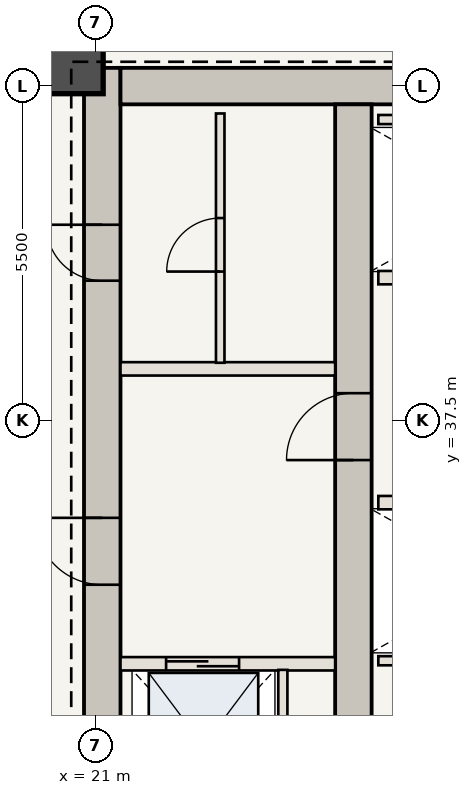
"""IFC4 building model, lengths in metres.
Left out: names, types, materials, properties, quantities, classifications, styles, units other than length and angle.
Written with IfcOpenShell. Run it as: python <this file> out.ifc"""

import sys

from ifc_helpers import new_model, si_unit, direction, frame, frame_2d, origin, origin_2d, place, context, subcontext, project, spatial, rectangle, extrude, element, fill, save


model = new_model("IFC4")
c1 = context("Model", 3, precision=1e-05, world=origin(), true_north=direction((0.0, 1.0)))
c2 = subcontext(c1, "Body", "Model", "MODEL_VIEW")
j1 = project(units=[si_unit("LENGTHUNIT", "METRE"), si_unit("PLANEANGLEUNIT", "RADIAN")], contexts=[c1])
p1 = place(None, origin())
s1 = spatial("IfcSite", under=j1, at=p1, CompositionType="ELEMENT")
p2 = place(p1, origin())
s2 = spatial("IfcBuilding", under=s1, at=p2, CompositionType="ELEMENT")
p3 = place(p2, frame((0.0, 0.0, 149.1)))
s3 = spatial("IfcBuildingStorey", under=s2, at=p3, CompositionType="ELEMENT", Elevation=149.1)
p4 = place(p3, frame((21.11, 30.6, 0.0), z_axis=(0.0, 0.0, 1.0), x_axis=(0.0, 1.0, 0.0)))
e1 = element("IfcWall", 1, at=p4, inside=s3, PredefinedType="SHEAR", context=c2, shape_type="SweptSolid", body=[
    extrude(rectangle(XDim=12.7, YDim=0.6, at=frame_2d((6.35, 0.0))), origin(), (0.0, 0.0, 1.0), 3.85),
])
p5 = place(p4, frame((4.2, 0.0, 0.0)))
e2 = element("IfcOpeningElement", 2, at=p5, cuts=e1, PredefinedType="OPENING", context=c2, shape_type="SweptSolid", body=[
    extrude(rectangle(XDim=1.1, YDim=2.15, at=frame_2d((0.55, 1.075))), frame((0.0, 0.31, 0.0), z_axis=(0.0, -1.0, 0.0), x_axis=(1.0, 0.0, 0.0)), (0.0, 0.0, 1.0), 0.62),
])
p6 = place(p4, frame((9.2, 0.0, 0.0)))
e3 = element("IfcOpeningElement", 3, at=p6, cuts=e1, PredefinedType="OPENING", context=c2, shape_type="SweptSolid", body=[
    extrude(rectangle(XDim=0.92, YDim=2.1, at=frame_2d((0.46, 1.05))), frame((0.0, 0.31, 0.0), z_axis=(0.0, -1.0, 0.0), x_axis=(1.0, 0.0, 0.0)), (0.0, 0.0, 1.0), 0.62),
])
p7 = place(p3, frame((21.41, 43.0, 0.0), z_axis=(0.0, 0.0, 1.0), x_axis=(1.0, 0.0, 0.0)))
e4 = element("IfcWall", 4, at=p7, inside=s3, PredefinedType="SHEAR", context=c2, shape_type="SweptSolid", body=[
    extrude(rectangle(XDim=8.24, YDim=0.6, at=frame_2d((4.12, 0.0))), origin(), (0.0, 0.0, 1.0), 3.85),
])
p8 = place(p3, frame((25.24, 30.6, 0.0), z_axis=(0.0, 0.0, 1.0), x_axis=(0.0, 1.0, 0.0)))
e5 = element("IfcWall", 5, at=p8, inside=s3, PredefinedType="SHEAR", context=c2, shape_type="SweptSolid", body=[
    extrude(rectangle(XDim=12.1, YDim=0.6, at=frame_2d((6.05, 0.0))), origin(), (0.0, 0.0, 1.0), 3.85),
])
p9 = place(p8, frame((6.25, 0.0, 0.0)))
e6 = element("IfcOpeningElement", 6, at=p9, cuts=e5, PredefinedType="OPENING", context=c2, shape_type="SweptSolid", body=[
    extrude(rectangle(XDim=1.1, YDim=2.15, at=frame_2d((0.55, 1.075))), frame((0.0, 0.31, 0.0), z_axis=(0.0, -1.0, 0.0), x_axis=(1.0, 0.0, 0.0)), (0.0, 0.0, 1.0), 0.62),
])
p10 = place(p3, frame((20.65, 43.35, 0.0), z_axis=(0.0, 0.0, 1.0), x_axis=(1.0, 0.0, 0.0)))
e7 = element("IfcColumn", 7, at=p10, inside=s3, PredefinedType="COLUMN", context=c2, shape_type="SweptSolid", body=[
    extrude(rectangle(XDim=0.95, YDim=0.95, at=origin_2d()), origin(), (0.0, 0.0, 1.0), 3.85),
])
p11 = place(p3, frame((21.41, 33.5, 0.0), z_axis=(0.0, 0.0, 1.0), x_axis=(1.0, 0.0, 0.0)))
e8 = element("IfcWall", 8, at=p11, inside=s3, PredefinedType="STANDARD", context=c2, shape_type="SweptSolid", body=[
    extrude(rectangle(XDim=3.53, YDim=0.22, at=frame_2d((1.765, 0.0))), origin(), (0.0, 0.0, 1.0), 3.685),
])
p12 = place(p11, frame((0.75, 0.0, 0.0)))
e9 = element("IfcOpeningElement", 9, at=p12, cuts=e8, PredefinedType="OPENING", context=c2, shape_type="SweptSolid", body=[
    extrude(rectangle(XDim=1.2, YDim=2.2, at=frame_2d((0.6, 1.1))), frame((0.0, 0.12, 0.0), z_axis=(0.0, -1.0, 0.0), x_axis=(1.0, 0.0, 0.0)), (0.0, 0.0, 1.0), 0.24),
])
p13 = place(p3, frame((24.08, 30.75, 0.0), z_axis=(0.0, 0.0, 1.0), x_axis=(0.0, 1.0, 0.0)))
e10 = element("IfcWall", 10, at=p13, inside=s3, PredefinedType="STANDARD", context=c2, shape_type="SweptSolid", body=[
    extrude(rectangle(XDim=2.65, YDim=0.15, at=frame_2d((1.325, 0.0))), origin(), (0.0, 0.0, 1.0), 3.685),
])
p14 = place(p3, frame((21.41, 38.35, 0.0), z_axis=(0.0, 0.0, 1.0), x_axis=(1.0, 0.0, 0.0)))
e11 = element("IfcWall", 11, at=p14, inside=s3, PredefinedType="STANDARD", context=c2, shape_type="SweptSolid", body=[
    extrude(rectangle(XDim=3.53, YDim=0.22, at=frame_2d((1.765, 0.0))), origin(), (0.0, 0.0, 1.0), 3.685),
])
p15 = place(p3, frame((23.05, 38.45, 0.0), z_axis=(0.0, 0.0, 1.0), x_axis=(0.0, 1.0, 0.0)))
e12 = element("IfcWall", 12, at=p15, inside=s3, PredefinedType="STANDARD", context=c2, shape_type="SweptSolid", body=[
    extrude(rectangle(XDim=4.1, YDim=0.14, at=frame_2d((2.05, 0.0))), origin(), (0.0, 0.0, 1.0), 3.685),
])
p16 = place(p15, frame((1.5, 0.0, 0.0)))
e13 = element("IfcOpeningElement", 13, at=p16, cuts=e12, PredefinedType="OPENING", context=c2, shape_type="SweptSolid", body=[
    extrude(rectangle(XDim=0.88, YDim=2.1, at=frame_2d((0.44, 1.05))), frame((0.0, 0.08, 0.0), z_axis=(0.0, -1.0, 0.0), x_axis=(1.0, 0.0, 0.0)), (0.0, 0.0, 1.0), 0.16),
])
p17 = place(p3, frame((25.65, 36.15, 0.0), z_axis=(0.0, 0.0, 1.0), x_axis=(1.0, 0.0, 0.0)))
e14 = element("IfcWall", 14, at=p17, inside=s3, PredefinedType="STANDARD", context=c2, shape_type="SweptSolid", body=[
    extrude(rectangle(XDim=4.3, YDim=0.22, at=frame_2d((2.15, 0.0))), origin(), (0.0, 0.0, 1.0), 3.685),
])
p18 = place(p3, frame((25.65, 33.55, 0.0), z_axis=(0.0, 0.0, 1.0), x_axis=(1.0, 0.0, 0.0)))
e15 = element("IfcWall", 15, at=p18, inside=s3, PredefinedType="STANDARD", context=c2, shape_type="SweptSolid", body=[
    extrude(rectangle(XDim=4.2, YDim=0.15, at=frame_2d((2.1, 0.0))), origin(), (0.0, 0.0, 1.0), 3.685),
])
p19 = place(p3, frame((25.65, 39.85, 0.0), z_axis=(0.0, 0.0, 1.0), x_axis=(1.0, 0.0, 0.0)))
e16 = element("IfcWall", 16, at=p19, inside=s3, PredefinedType="STANDARD", context=c2, shape_type="SweptSolid", body=[
    extrude(rectangle(XDim=4.3, YDim=0.22, at=frame_2d((2.15, 0.0))), origin(), (0.0, 0.0, 1.0), 3.685),
])
p20 = place(p3, frame((25.65, 42.45, 0.0), z_axis=(0.0, 0.0, 1.0), x_axis=(1.0, 0.0, 0.0)))
e17 = element("IfcWall", 17, at=p20, inside=s3, PredefinedType="STANDARD", context=c2, shape_type="SweptSolid", body=[
    extrude(rectangle(XDim=4.2, YDim=0.15, at=frame_2d((2.1, 0.0))), origin(), (0.0, 0.0, 1.0), 3.685),
])
p21 = place(p5, origin())
e18 = element("IfcDoor", 18, at=p21, inside=s3, OperationType="SINGLE_SWING_RIGHT", PredefinedType="DOOR", context=c2, shape_type="SweptSolid", body=[
    extrude(rectangle(XDim=1.1, YDim=2.15, at=frame_2d((0.55, 1.075))), frame((0.0, 0.025, 0.0), z_axis=(0.0, -1.0, 0.0), x_axis=(1.0, 0.0, 0.0)), (0.0, 0.0, 1.0), 0.05),
])
fill(e2, e18)
p22 = place(p9, origin())
e19 = element("IfcDoor", 19, at=p22, inside=s3, OperationType="SINGLE_SWING_LEFT", PredefinedType="DOOR", context=c2, shape_type="SweptSolid", body=[
    extrude(rectangle(XDim=1.1, YDim=2.15, at=frame_2d((0.55, 1.075))), frame((0.0, 0.025, 0.0), z_axis=(0.0, -1.0, 0.0), x_axis=(1.0, 0.0, 0.0)), (0.0, 0.0, 1.0), 0.05),
])
fill(e6, e19)
p23 = place(p6, origin())
e20 = element("IfcDoor", 20, at=p23, inside=s3, OperationType="SINGLE_SWING_RIGHT", PredefinedType="DOOR", context=c2, shape_type="SweptSolid", body=[
    extrude(rectangle(XDim=0.92, YDim=2.1, at=frame_2d((0.46, 1.05))), frame((0.0, 0.025, 0.0), z_axis=(0.0, -1.0, 0.0), x_axis=(1.0, 0.0, 0.0)), (0.0, 0.0, 1.0), 0.05),
])
fill(e3, e20)
p24 = place(p12, origin())
e21 = element("IfcDoor", 21, at=p24, inside=s3, OperationType="DOUBLE_DOOR_SLIDING", PredefinedType="DOOR", context=c2, shape_type="SweptSolid", body=[
    extrude(rectangle(XDim=1.2, YDim=2.2, at=frame_2d((0.6, 1.1))), frame((0.0, 0.025, 0.0), z_axis=(0.0, -1.0, 0.0), x_axis=(1.0, 0.0, 0.0)), (0.0, 0.0, 1.0), 0.05),
])
fill(e9, e21)
p25 = place(p16, origin())
e22 = element("IfcDoor", 22, at=p25, inside=s3, OperationType="SINGLE_SWING_LEFT", PredefinedType="DOOR", context=c2, shape_type="SweptSolid", body=[
    extrude(rectangle(XDim=0.88, YDim=2.1, at=frame_2d((0.44, 1.05))), frame((0.0, 0.025, 0.0), z_axis=(0.0, -1.0, 0.0), x_axis=(1.0, 0.0, 0.0)), (0.0, 0.0, 1.0), 0.05),
])
fill(e13, e22)
save(model, sys.argv[1])
